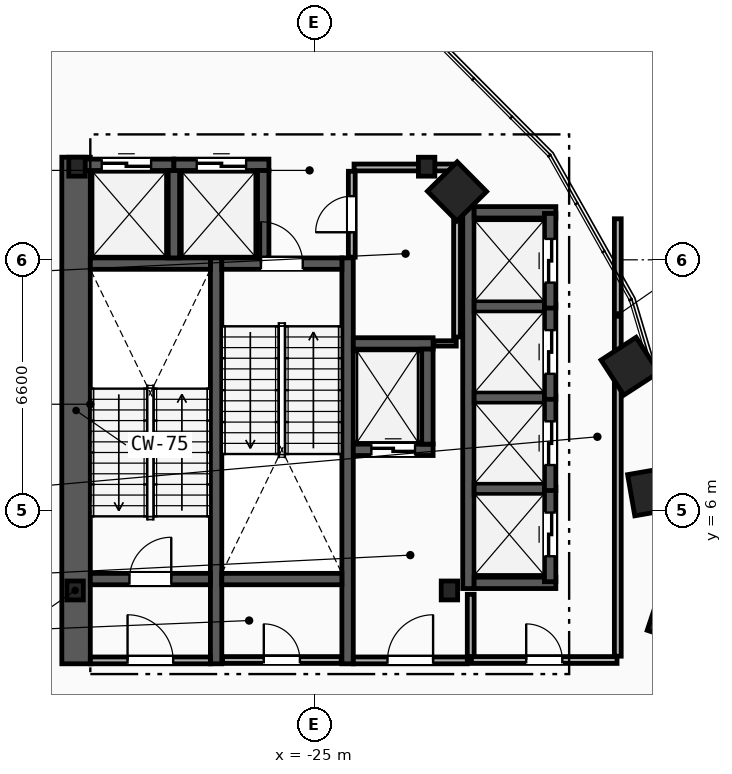
"""IFC4 building model, lengths in metres.
Left out: names, types, materials, properties, quantities, classifications, styles, units other than length and angle.
Written with IfcOpenShell. Run it as: python <this file> out.ifc"""

import sys

from ifc_helpers import new_model, si_unit, direction, frame, frame_2d, origin, origin_2d, place, context, subcontext, project, spatial, rectangle, i_section, extrude, element, fill, save


model = new_model("IFC4")
c1 = context("Model", 3, precision=1e-05, world=origin(), true_north=direction((0.0, 1.0)))
c2 = subcontext(c1, "Body", "Model", "MODEL_VIEW")
j1 = project(units=[si_unit("LENGTHUNIT", "METRE"), si_unit("PLANEANGLEUNIT", "RADIAN")], contexts=[c1])
p1 = place(None, origin())
s1 = spatial("IfcSite", under=j1, at=p1, CompositionType="ELEMENT")
p2 = place(p1, origin())
s2 = spatial("IfcBuilding", under=s1, at=p2, CompositionType="ELEMENT")
p3 = place(p2, frame((0.0, 0.0, 132.2)))
s3 = spatial("IfcBuildingStorey", under=s2, at=p3, CompositionType="ELEMENT", Elevation=132.2)
for number, where, z_axis, x_axis in (
    (1, (-31.3, 3.9, 0.0), (0.0, 0.0, 1.0), (1.0, 0.0, 0.0)),
    (2, (-21.45, 3.9, 0.0), (0.0, 0.0, 1.0), (1.0, 0.0, 0.0)),
    (3, (-22.05, 15.05, 0.0), (0.0, 0.0, 1.0), (1.0, 0.0, 0.0)),
    (4, (-31.25, 15.05, 0.0), (0.0, 0.0, 1.0), (1.0, 0.0, 0.0)),
):
    element("IfcColumn", number, at=place(p3, frame(where, z_axis=z_axis, x_axis=x_axis)), inside=s3, PredefinedType="COLUMN", context=c2, shape_type="SweptSolid", body=[
        extrude(i_section(OverallWidth=0.432, OverallDepth=0.498, WebThickness=0.056, FlangeThickness=0.089, FilletRadius=0.018, at=origin_2d()), origin(), (0.0, 0.0, 1.0), 4.6),
    ])
for number, where, z_axis, x_axis in (
    (5, (-15.55, 3.2, 0.0), (0.0, 0.0, 1.0), (0.315, 0.949, 0.0)),
    (6, (-16.125, 6.5, 0.0), (0.0, 0.0, 1.0), (-0.172, 0.985, 0.0)),
    (7, (-16.7, 9.8, 0.0), (0.0, 0.0, 1.0), (-0.544, 0.839, 0.0)),
    (8, (-21.25, 14.4, 0.0), (0.0, 0.0, 1.0), (-0.703, 0.711, 0.0)),
):
    element("IfcColumn", number, at=place(p3, frame(where, z_axis=z_axis, x_axis=x_axis)), inside=s3, PredefinedType="COLUMN", context=c2, shape_type="SweptSolid", body=[
        extrude(rectangle(XDim=1.1, YDim=1.1, at=origin_2d()), origin(), (0.0, 0.0, 1.0), 4.6),
    ])
p4 = place(p3, frame((-31.275, 1.97, 0.0), z_axis=(0.0, 0.0, 1.0), x_axis=(0.0, 1.0, 0.0)))
e9 = element("IfcWall", 9, at=p4, inside=s3, PredefinedType="SHEAR", context=c2, shape_type="SweptSolid", body=[
    extrude(rectangle(XDim=13.33, YDim=0.75, at=frame_2d((6.665, 0.0))), origin(), (0.0, 0.0, 1.0), 4.36),
])
for number, where, z_axis, x_axis in (
    (10, (-27.59, 1.97, 0.0), (0.0, 0.0, 1.0), (0.0, 1.0, 0.0)),
    (11, (-24.13, 1.97, 0.0), (0.0, 0.0, 1.0), (0.0, 1.0, 0.0)),
):
    element("IfcWall", number, at=place(p3, frame(where, z_axis=z_axis, x_axis=x_axis)), inside=s3, PredefinedType="SHEAR", context=c2, shape_type="SweptSolid", body=[
        extrude(rectangle(XDim=10.68, YDim=0.3, at=frame_2d((5.34, 0.0))), origin(), (0.0, 0.0, 1.0), 4.36),
    ])
p5 = place(p3, frame((-30.9, 4.2, 0.0), z_axis=(0.0, 0.0, 1.0), x_axis=(1.0, 0.0, 0.0)))
e12 = element("IfcWall", 12, at=p5, inside=s3, PredefinedType="SHEAR", context=c2, shape_type="SweptSolid", body=[
    extrude(rectangle(XDim=3.16, YDim=0.3, at=frame_2d((1.58, 0.0))), origin(), (0.0, 0.0, 1.0), 4.36),
])
p6 = place(p5, frame((1.03, 0.0, 0.0)))
e13 = element("IfcOpeningElement", 13, at=p6, cuts=e12, PredefinedType="OPENING", context=c2, shape_type="SweptSolid", body=[
    extrude(rectangle(XDim=1.1, YDim=2.15, at=frame_2d((0.55, 1.075))), frame((0.0, 0.16, 0.0), z_axis=(0.0, -1.0, 0.0), x_axis=(1.0, 0.0, 0.0)), (0.0, 0.0, 1.0), 0.32),
])
p7 = place(p3, frame((-30.9, 12.5, 0.0), z_axis=(0.0, 0.0, 1.0), x_axis=(1.0, 0.0, 0.0)))
e14 = element("IfcWall", 14, at=p7, inside=s3, PredefinedType="SHEAR", context=c2, shape_type="SweptSolid", body=[
    extrude(rectangle(XDim=3.16, YDim=0.3, at=frame_2d((1.58, 0.0))), origin(), (0.0, 0.0, 1.0), 4.36),
])
p8 = place(p3, frame((-27.44, 12.5, 0.0), z_axis=(0.0, 0.0, 1.0), x_axis=(1.0, 0.0, 0.0)))
e15 = element("IfcWall", 15, at=p8, inside=s3, PredefinedType="SHEAR", context=c2, shape_type="SweptSolid", body=[
    extrude(rectangle(XDim=3.16, YDim=0.3, at=frame_2d((1.58, 0.0))), origin(), (0.0, 0.0, 1.0), 4.36),
])
p9 = place(p8, frame((1.03, 0.0, 0.0)))
e16 = element("IfcOpeningElement", 16, at=p9, cuts=e15, PredefinedType="OPENING", context=c2, shape_type="SweptSolid", body=[
    extrude(rectangle(XDim=1.1, YDim=2.15, at=frame_2d((0.55, 1.075))), frame((0.0, 0.16, 0.0), z_axis=(0.0, -1.0, 0.0), x_axis=(1.0, 0.0, 0.0)), (0.0, 0.0, 1.0), 0.32),
])
p10 = place(p3, frame((-27.44, 4.2, 0.0), z_axis=(0.0, 0.0, 1.0), x_axis=(1.0, 0.0, 0.0)))
e17 = element("IfcWall", 17, at=p10, inside=s3, PredefinedType="SHEAR", context=c2, shape_type="SweptSolid", body=[
    extrude(rectangle(XDim=3.16, YDim=0.3, at=frame_2d((1.58, 0.0))), origin(), (0.0, 0.0, 1.0), 4.36),
])
p11 = place(p3, frame((-20.89, 2.15, 0.0), z_axis=(0.0, 0.0, 1.0), x_axis=(0.0, 1.0, 0.0)))
e18 = element("IfcWall", 18, at=p11, inside=s3, PredefinedType="PARTITIONING", context=c2, shape_type="SweptSolid", body=[
    extrude(rectangle(XDim=1.65, YDim=0.18, at=frame_2d((0.825, 0.0))), origin(), (0.0, 0.0, 1.0), 4.36),
])
p12 = place(p3, frame((-23.98, 2.06, 0.0), z_axis=(0.0, 0.0, 1.0), x_axis=(1.0, 0.0, 0.0)))
e19 = element("IfcWall", 19, at=p12, inside=s3, PredefinedType="PARTITIONING", context=c2, shape_type="SweptSolid", body=[
    extrude(rectangle(XDim=3.0, YDim=0.18, at=frame_2d((1.5, 0.0))), origin(), (0.0, 0.0, 1.0), 4.36),
])
p13 = place(p12, frame((0.9, 0.0, 0.0)))
e20 = element("IfcOpeningElement", 20, at=p13, cuts=e19, PredefinedType="OPENING", context=c2, shape_type="SweptSolid", body=[
    extrude(rectangle(XDim=1.2, YDim=2.15, at=frame_2d((0.6, 1.075))), frame((0.0, 0.1, 0.0), z_axis=(0.0, -1.0, 0.0), x_axis=(1.0, 0.0, 0.0)), (0.0, 0.0, 1.0), 0.2),
])
p14 = place(p3, frame((-30.9, 2.06, 0.0), z_axis=(0.0, 0.0, 1.0), x_axis=(1.0, 0.0, 0.0)))
e21 = element("IfcWall", 21, at=p14, inside=s3, PredefinedType="PARTITIONING", context=c2, shape_type="SweptSolid", body=[
    extrude(rectangle(XDim=3.16, YDim=0.18, at=frame_2d((1.58, 0.0))), origin(), (0.0, 0.0, 1.0), 4.36),
])
p15 = place(p14, frame((0.98, 0.0, 0.0)))
e22 = element("IfcOpeningElement", 22, at=p15, cuts=e21, PredefinedType="OPENING", context=c2, shape_type="SweptSolid", body=[
    extrude(rectangle(XDim=1.2, YDim=2.15, at=frame_2d((0.6, 1.075))), frame((0.0, 0.1, 0.0), z_axis=(0.0, -1.0, 0.0), x_axis=(1.0, 0.0, 0.0)), (0.0, 0.0, 1.0), 0.2),
])
p16 = place(p3, frame((-23.98, 7.6, 0.0), z_axis=(0.0, 0.0, 1.0), x_axis=(1.0, 0.0, 0.0)))
e23 = element("IfcWall", 23, at=p16, inside=s3, PredefinedType="SHEAR", context=c2, shape_type="SweptSolid", body=[
    extrude(rectangle(XDim=2.1, YDim=0.3, at=frame_2d((1.05, 0.0))), origin(), (0.0, 0.0, 1.0), 4.36),
])
p17 = place(p16, frame((0.475, 0.0, 0.0)))
e24 = element("IfcOpeningElement", 24, at=p17, cuts=e23, PredefinedType="OPENING", context=c2, shape_type="SweptSolid", body=[
    extrude(rectangle(XDim=1.15, YDim=2.2, at=frame_2d((0.575, 1.1))), frame((0.0, 0.16, 0.0), z_axis=(0.0, -1.0, 0.0), x_axis=(1.0, 0.0, 0.0)), (0.0, 0.0, 1.0), 0.32),
])
p18 = place(p3, frame((-23.98, 10.4, 0.0), z_axis=(0.0, 0.0, 1.0), x_axis=(1.0, 0.0, 0.0)))
e25 = element("IfcWall", 25, at=p18, inside=s3, PredefinedType="SHEAR", context=c2, shape_type="SweptSolid", body=[
    extrude(rectangle(XDim=2.1, YDim=0.3, at=frame_2d((1.05, 0.0))), origin(), (0.0, 0.0, 1.0), 4.36),
])
p19 = place(p3, frame((-22.03, 7.75, 0.0), z_axis=(0.0, 0.0, 1.0), x_axis=(0.0, 1.0, 0.0)))
e26 = element("IfcWall", 26, at=p19, inside=s3, PredefinedType="SHEAR", context=c2, shape_type="SweptSolid", body=[
    extrude(rectangle(XDim=2.5, YDim=0.3, at=frame_2d((1.25, 0.0))), origin(), (0.0, 0.0, 1.0), 4.36),
])
p20 = place(p3, frame((-31.2, 15.1, 0.0), z_axis=(0.0, 0.0, 1.0), x_axis=(1.0, 0.0, 0.0)))
e27 = element("IfcWall", 27, at=p20, inside=s3, PredefinedType="SHEAR", context=c2, shape_type="SweptSolid", body=[
    extrude(rectangle(XDim=2.5, YDim=0.3, at=frame_2d((1.25, 0.0))), origin(), (0.0, 0.0, 1.0), 4.36),
])
p21 = place(p20, frame((0.6, 0.0, 0.0)))
e28 = element("IfcOpeningElement", 28, at=p21, cuts=e27, PredefinedType="OPENING", context=c2, shape_type="SweptSolid", body=[
    extrude(rectangle(XDim=1.3, YDim=2.2, at=frame_2d((0.65, 1.1))), frame((0.0, 0.16, 0.0), z_axis=(0.0, -1.0, 0.0), x_axis=(1.0, 0.0, 0.0)), (0.0, 0.0, 1.0), 0.32),
])
p22 = place(p3, frame((-28.7, 12.65, 0.0), z_axis=(0.0, 0.0, 1.0), x_axis=(0.0, 1.0, 0.0)))
e29 = element("IfcWall", 29, at=p22, inside=s3, PredefinedType="SHEAR", context=c2, shape_type="SweptSolid", body=[
    extrude(rectangle(XDim=2.3, YDim=0.3, at=frame_2d((1.15, 0.0))), origin(), (0.0, 0.0, 1.0), 4.36),
])
p23 = place(p3, frame((-28.7, 15.1, 0.0), z_axis=(0.0, 0.0, 1.0), x_axis=(1.0, 0.0, 0.0)))
e30 = element("IfcWall", 30, at=p23, inside=s3, PredefinedType="SHEAR", context=c2, shape_type="SweptSolid", body=[
    extrude(rectangle(XDim=2.5, YDim=0.3, at=frame_2d((1.25, 0.0))), origin(), (0.0, 0.0, 1.0), 4.36),
])
p24 = place(p23, frame((0.6, 0.0, 0.0)))
e31 = element("IfcOpeningElement", 31, at=p24, cuts=e30, PredefinedType="OPENING", context=c2, shape_type="SweptSolid", body=[
    extrude(rectangle(XDim=1.3, YDim=2.2, at=frame_2d((0.65, 1.1))), frame((0.0, 0.16, 0.0), z_axis=(0.0, -1.0, 0.0), x_axis=(1.0, 0.0, 0.0)), (0.0, 0.0, 1.0), 0.32),
])
p25 = place(p3, frame((-26.35, 12.65, 0.0), z_axis=(0.0, 0.0, 1.0), x_axis=(0.0, 1.0, 0.0)))
e32 = element("IfcWall", 32, at=p25, inside=s3, PredefinedType="SHEAR", context=c2, shape_type="SweptSolid", body=[
    extrude(rectangle(XDim=2.3, YDim=0.3, at=frame_2d((1.15, 0.0))), origin(), (0.0, 0.0, 1.0), 4.36),
])
p26 = place(p3, frame((-20.95, 3.95, 0.0), z_axis=(0.0, 0.0, 1.0), x_axis=(0.0, 1.0, 0.0)))
e33 = element("IfcWall", 33, at=p26, inside=s3, PredefinedType="SHEAR", context=c2, shape_type="SweptSolid", body=[
    extrude(rectangle(XDim=10.05, YDim=0.3, at=frame_2d((5.025, 0.0))), origin(), (0.0, 0.0, 1.0), 4.36),
])
for number, where, z_axis, x_axis in (
    (34, (-20.8, 4.1, 0.0), (0.0, 0.0, 1.0), (1.0, 0.0, 0.0)),
    (35, (-20.8, 13.85, 0.0), (0.0, 0.0, 1.0), (1.0, 0.0, 0.0)),
):
    element("IfcWall", number, at=place(p3, frame(where, z_axis=z_axis, x_axis=x_axis)), inside=s3, PredefinedType="SHEAR", context=c2, shape_type="SweptSolid", body=[
        extrude(rectangle(XDim=2.15, YDim=0.3, at=frame_2d((1.075, 0.0))), origin(), (0.0, 0.0, 1.0), 4.36),
    ])
for number, where, z_axis, x_axis in (
    (36, (-20.8, 6.575, 0.0), (0.0, 0.0, 1.0), (1.0, 0.0, 0.0)),
    (37, (-20.8, 8.975, 0.0), (0.0, 0.0, 1.0), (1.0, 0.0, 0.0)),
    (38, (-20.8, 11.375, 0.0), (0.0, 0.0, 1.0), (1.0, 0.0, 0.0)),
):
    element("IfcWall", number, at=place(p3, frame(where, z_axis=z_axis, x_axis=x_axis)), inside=s3, PredefinedType="SHEAR", context=c2, shape_type="SweptSolid", body=[
        extrude(rectangle(XDim=1.85, YDim=0.3, at=frame_2d((0.925, 0.0))), origin(), (0.0, 0.0, 1.0), 4.36),
    ])
p27 = place(p3, frame((-18.8, 4.13, 0.0), z_axis=(0.0, 0.0, 1.0), x_axis=(0.0, 1.0, 0.0)))
e39 = element("IfcWall", 39, at=p27, inside=s3, PredefinedType="SHEAR", context=c2, shape_type="SweptSolid", body=[
    extrude(rectangle(XDim=2.49, YDim=0.3, at=frame_2d((1.245, 0.0))), origin(), (0.0, 0.0, 1.0), 4.36),
])
p28 = place(p27, frame((0.67, 0.0, 0.0)))
e40 = element("IfcOpeningElement", 40, at=p28, cuts=e39, PredefinedType="OPENING", context=c2, shape_type="SweptSolid", body=[
    extrude(rectangle(XDim=1.15, YDim=2.2, at=frame_2d((0.575, 1.1))), frame((0.0, 0.16, 0.0), z_axis=(0.0, -1.0, 0.0), x_axis=(1.0, 0.0, 0.0)), (0.0, 0.0, 1.0), 0.32),
])
p29 = place(p3, frame((-18.8, 6.53, 0.0), z_axis=(0.0, 0.0, 1.0), x_axis=(0.0, 1.0, 0.0)))
e41 = element("IfcWall", 41, at=p29, inside=s3, PredefinedType="SHEAR", context=c2, shape_type="SweptSolid", body=[
    extrude(rectangle(XDim=2.49, YDim=0.3, at=frame_2d((1.245, 0.0))), origin(), (0.0, 0.0, 1.0), 4.36),
])
p30 = place(p29, frame((0.67, 0.0, 0.0)))
e42 = element("IfcOpeningElement", 42, at=p30, cuts=e41, PredefinedType="OPENING", context=c2, shape_type="SweptSolid", body=[
    extrude(rectangle(XDim=1.15, YDim=2.2, at=frame_2d((0.575, 1.1))), frame((0.0, 0.16, 0.0), z_axis=(0.0, -1.0, 0.0), x_axis=(1.0, 0.0, 0.0)), (0.0, 0.0, 1.0), 0.32),
])
p31 = place(p3, frame((-18.8, 8.93, 0.0), z_axis=(0.0, 0.0, 1.0), x_axis=(0.0, 1.0, 0.0)))
e43 = element("IfcWall", 43, at=p31, inside=s3, PredefinedType="SHEAR", context=c2, shape_type="SweptSolid", body=[
    extrude(rectangle(XDim=2.49, YDim=0.3, at=frame_2d((1.245, 0.0))), origin(), (0.0, 0.0, 1.0), 4.36),
])
p32 = place(p31, frame((0.67, 0.0, 0.0)))
e44 = element("IfcOpeningElement", 44, at=p32, cuts=e43, PredefinedType="OPENING", context=c2, shape_type="SweptSolid", body=[
    extrude(rectangle(XDim=1.15, YDim=2.2, at=frame_2d((0.575, 1.1))), frame((0.0, 0.16, 0.0), z_axis=(0.0, -1.0, 0.0), x_axis=(1.0, 0.0, 0.0)), (0.0, 0.0, 1.0), 0.32),
])
p33 = place(p3, frame((-18.8, 11.33, 0.0), z_axis=(0.0, 0.0, 1.0), x_axis=(0.0, 1.0, 0.0)))
e45 = element("IfcWall", 45, at=p33, inside=s3, PredefinedType="SHEAR", context=c2, shape_type="SweptSolid", body=[
    extrude(rectangle(XDim=2.49, YDim=0.3, at=frame_2d((1.245, 0.0))), origin(), (0.0, 0.0, 1.0), 4.36),
])
p34 = place(p33, frame((0.67, 0.0, 0.0)))
e46 = element("IfcOpeningElement", 46, at=p34, cuts=e45, PredefinedType="OPENING", context=c2, shape_type="SweptSolid", body=[
    extrude(rectangle(XDim=1.15, YDim=2.2, at=frame_2d((0.575, 1.1))), frame((0.0, 0.16, 0.0), z_axis=(0.0, -1.0, 0.0), x_axis=(1.0, 0.0, 0.0)), (0.0, 0.0, 1.0), 0.32),
])
p35 = place(p3, frame((-17.02, 2.17, 0.0), z_axis=(0.0, 0.0, 1.0), x_axis=(0.0, 1.0, 0.0)))
e47 = element("IfcWall", 47, at=p35, inside=s3, PredefinedType="PARTITIONING", context=c2, shape_type="SweptSolid", body=[
    extrude(rectangle(XDim=11.51, YDim=0.18, at=frame_2d((5.755, 0.0))), origin(), (0.0, 0.0, 1.0), 4.36),
])
p36 = place(p3, frame((-20.87, 2.07, 0.0), z_axis=(0.0, 0.0, 1.0), x_axis=(1.0, 0.0, 0.0)))
e48 = element("IfcWall", 48, at=p36, inside=s3, PredefinedType="PARTITIONING", context=c2, shape_type="SweptSolid", body=[
    extrude(rectangle(XDim=3.83, YDim=0.18, at=frame_2d((1.915, 0.0))), origin(), (0.0, 0.0, 1.0), 4.36),
])
p37 = place(p36, frame((1.44, 0.0, 0.0)))
e49 = element("IfcOpeningElement", 49, at=p37, cuts=e48, PredefinedType="OPENING", context=c2, shape_type="SweptSolid", body=[
    extrude(rectangle(XDim=0.95, YDim=2.1, at=frame_2d((0.475, 1.05))), frame((0.0, 0.1, 0.0), z_axis=(0.0, -1.0, 0.0), x_axis=(1.0, 0.0, 0.0)), (0.0, 0.0, 1.0), 0.2),
])
p38 = place(p3, frame((-21.86, 10.4, 0.0), z_axis=(0.0, 0.0, 1.0), x_axis=(1.0, 0.0, 0.0)))
e50 = element("IfcWall", 50, at=p38, inside=s3, PredefinedType="PARTITIONING", context=c2, shape_type="SweptSolid", body=[
    extrude(rectangle(XDim=0.59, YDim=0.14, at=frame_2d((0.295, 0.0))), origin(), (0.0, 0.0, 1.0), 4.36),
])
p39 = place(p3, frame((-21.25, 10.57, 0.0), z_axis=(0.0, 0.0, 1.0), x_axis=(0.0, 1.0, 0.0)))
e51 = element("IfcWall", 51, at=p39, inside=s3, PredefinedType="PARTITIONING", context=c2, shape_type="SweptSolid", body=[
    extrude(rectangle(XDim=4.36, YDim=0.18, at=frame_2d((2.18, 0.0))), origin(), (0.0, 0.0, 1.0), 4.36),
])
p40 = place(p3, frame((-23.96, 15.03, 0.0), z_axis=(0.0, 0.0, 1.0), x_axis=(1.0, 0.0, 0.0)))
e52 = element("IfcWall", 52, at=p40, inside=s3, PredefinedType="PARTITIONING", context=c2, shape_type="SweptSolid", body=[
    extrude(rectangle(XDim=2.61, YDim=0.18, at=frame_2d((1.305, 0.0))), origin(), (0.0, 0.0, 1.0), 3.433),
])
p41 = place(p3, frame((-27.42, 2.07, 0.0), z_axis=(0.0, 0.0, 1.0), x_axis=(1.0, 0.0, 0.0)))
e53 = element("IfcWall", 53, at=p41, inside=s3, PredefinedType="PARTITIONING", context=c2, shape_type="SweptSolid", body=[
    extrude(rectangle(XDim=3.12, YDim=0.18, at=frame_2d((1.56, 0.0))), origin(), (0.0, 0.0, 1.0), 4.36),
])
p42 = place(p41, frame((1.085, 0.0, 0.0)))
e54 = element("IfcOpeningElement", 54, at=p42, cuts=e53, PredefinedType="OPENING", context=c2, shape_type="SweptSolid", body=[
    extrude(rectangle(XDim=0.95, YDim=2.1, at=frame_2d((0.475, 1.05))), frame((0.0, 0.1, 0.0), z_axis=(0.0, -1.0, 0.0), x_axis=(1.0, 0.0, 0.0)), (0.0, 0.0, 1.0), 0.2),
])
p43 = place(p3, frame((-24.02, 12.67, 0.0), z_axis=(0.0, 0.0, 1.0), x_axis=(0.0, 1.0, 0.0)))
e55 = element("IfcWall", 55, at=p43, inside=s3, PredefinedType="PARTITIONING", context=c2, shape_type="SweptSolid", body=[
    extrude(rectangle(XDim=2.26, YDim=0.18, at=frame_2d((1.13, 0.0))), origin(), (0.0, 0.0, 1.0), 4.36),
])
p44 = place(p43, frame((0.655, 0.0, 0.0)))
e56 = element("IfcOpeningElement", 56, at=p44, cuts=e55, PredefinedType="OPENING", context=c2, shape_type="SweptSolid", body=[
    extrude(rectangle(XDim=0.95, YDim=2.1, at=frame_2d((0.475, 1.05))), frame((0.0, 0.1, 0.0), z_axis=(0.0, -1.0, 0.0), x_axis=(1.0, 0.0, 0.0)), (0.0, 0.0, 1.0), 0.2),
])
p45 = place(p6, origin())
e57 = element("IfcDoor", 57, at=p45, inside=s3, OperationType="SINGLE_SWING_RIGHT", PredefinedType="DOOR", context=c2, shape_type="SweptSolid", body=[
    extrude(rectangle(XDim=1.1, YDim=2.15, at=frame_2d((0.55, 1.075))), frame((0.0, 0.025, 0.0), z_axis=(0.0, -1.0, 0.0), x_axis=(1.0, 0.0, 0.0)), (0.0, 0.0, 1.0), 0.05),
])
fill(e13, e57)
p46 = place(p9, origin())
e58 = element("IfcDoor", 58, at=p46, inside=s3, OperationType="SINGLE_SWING_LEFT", PredefinedType="DOOR", context=c2, shape_type="SweptSolid", body=[
    extrude(rectangle(XDim=1.1, YDim=2.15, at=frame_2d((0.55, 1.075))), frame((0.0, 0.025, 0.0), z_axis=(0.0, -1.0, 0.0), x_axis=(1.0, 0.0, 0.0)), (0.0, 0.0, 1.0), 0.05),
])
fill(e16, e58)
p47 = place(p13, origin())
e59 = element("IfcDoor", 59, at=p47, inside=s3, OperationType="SINGLE_SWING_RIGHT", PredefinedType="DOOR", context=c2, shape_type="SweptSolid", body=[
    extrude(rectangle(XDim=1.2, YDim=2.15, at=frame_2d((0.6, 1.075))), frame((0.0, 0.025, 0.0), z_axis=(0.0, -1.0, 0.0), x_axis=(1.0, 0.0, 0.0)), (0.0, 0.0, 1.0), 0.05),
])
fill(e20, e59)
p48 = place(p15, origin())
e60 = element("IfcDoor", 60, at=p48, inside=s3, OperationType="SINGLE_SWING_LEFT", PredefinedType="DOOR", context=c2, shape_type="SweptSolid", body=[
    extrude(rectangle(XDim=1.2, YDim=2.15, at=frame_2d((0.6, 1.075))), frame((0.0, 0.025, 0.0), z_axis=(0.0, -1.0, 0.0), x_axis=(1.0, 0.0, 0.0)), (0.0, 0.0, 1.0), 0.05),
])
fill(e22, e60)
p49 = place(p17, origin())
e61 = element("IfcDoor", 61, at=p49, inside=s3, OperationType="SLIDING_TO_LEFT", PredefinedType="TRAPDOOR", context=c2, shape_type="SweptSolid", body=[
    extrude(rectangle(XDim=1.15, YDim=2.2, at=frame_2d((0.575, 1.1))), frame((0.0, 0.025, 0.0), z_axis=(0.0, -1.0, 0.0), x_axis=(1.0, 0.0, 0.0)), (0.0, 0.0, 1.0), 0.05),
])
fill(e24, e61)
p50 = place(p21, origin())
e62 = element("IfcDoor", 62, at=p50, inside=s3, OperationType="SLIDING_TO_LEFT", PredefinedType="TRAPDOOR", context=c2, shape_type="SweptSolid", body=[
    extrude(rectangle(XDim=1.3, YDim=2.2, at=frame_2d((0.65, 1.1))), frame((0.0, 0.025, 0.0), z_axis=(0.0, -1.0, 0.0), x_axis=(1.0, 0.0, 0.0)), (0.0, 0.0, 1.0), 0.05),
])
fill(e28, e62)
p51 = place(p24, origin())
e63 = element("IfcDoor", 63, at=p51, inside=s3, OperationType="SLIDING_TO_LEFT", PredefinedType="TRAPDOOR", context=c2, shape_type="SweptSolid", body=[
    extrude(rectangle(XDim=1.3, YDim=2.2, at=frame_2d((0.65, 1.1))), frame((0.0, 0.025, 0.0), z_axis=(0.0, -1.0, 0.0), x_axis=(1.0, 0.0, 0.0)), (0.0, 0.0, 1.0), 0.05),
])
fill(e31, e63)
p52 = place(p28, origin())
e64 = element("IfcDoor", 64, at=p52, inside=s3, OperationType="SLIDING_TO_LEFT", PredefinedType="TRAPDOOR", context=c2, shape_type="SweptSolid", body=[
    extrude(rectangle(XDim=1.15, YDim=2.2, at=frame_2d((0.575, 1.1))), frame((0.0, 0.025, 0.0), z_axis=(0.0, -1.0, 0.0), x_axis=(1.0, 0.0, 0.0)), (0.0, 0.0, 1.0), 0.05),
])
fill(e40, e64)
p53 = place(p30, origin())
e65 = element("IfcDoor", 65, at=p53, inside=s3, OperationType="SLIDING_TO_LEFT", PredefinedType="TRAPDOOR", context=c2, shape_type="SweptSolid", body=[
    extrude(rectangle(XDim=1.15, YDim=2.2, at=frame_2d((0.575, 1.1))), frame((0.0, 0.025, 0.0), z_axis=(0.0, -1.0, 0.0), x_axis=(1.0, 0.0, 0.0)), (0.0, 0.0, 1.0), 0.05),
])
fill(e42, e65)
p54 = place(p32, origin())
e66 = element("IfcDoor", 66, at=p54, inside=s3, OperationType="SLIDING_TO_LEFT", PredefinedType="TRAPDOOR", context=c2, shape_type="SweptSolid", body=[
    extrude(rectangle(XDim=1.15, YDim=2.2, at=frame_2d((0.575, 1.1))), frame((0.0, 0.025, 0.0), z_axis=(0.0, -1.0, 0.0), x_axis=(1.0, 0.0, 0.0)), (0.0, 0.0, 1.0), 0.05),
])
fill(e44, e66)
p55 = place(p34, origin())
e67 = element("IfcDoor", 67, at=p55, inside=s3, OperationType="SLIDING_TO_LEFT", PredefinedType="TRAPDOOR", context=c2, shape_type="SweptSolid", body=[
    extrude(rectangle(XDim=1.15, YDim=2.2, at=frame_2d((0.575, 1.1))), frame((0.0, 0.025, 0.0), z_axis=(0.0, -1.0, 0.0), x_axis=(1.0, 0.0, 0.0)), (0.0, 0.0, 1.0), 0.05),
])
fill(e46, e67)
p56 = place(p37, origin())
e68 = element("IfcDoor", 68, at=p56, inside=s3, OperationType="SINGLE_SWING_LEFT", PredefinedType="DOOR", context=c2, shape_type="SweptSolid", body=[
    extrude(rectangle(XDim=0.95, YDim=2.1, at=frame_2d((0.475, 1.05))), frame((0.0, 0.025, 0.0), z_axis=(0.0, -1.0, 0.0), x_axis=(1.0, 0.0, 0.0)), (0.0, 0.0, 1.0), 0.05),
])
fill(e49, e68)
p57 = place(p42, origin())
e69 = element("IfcDoor", 69, at=p57, inside=s3, OperationType="SINGLE_SWING_LEFT", PredefinedType="DOOR", context=c2, shape_type="SweptSolid", body=[
    extrude(rectangle(XDim=0.95, YDim=2.1, at=frame_2d((0.475, 1.05))), frame((0.0, 0.025, 0.0), z_axis=(0.0, -1.0, 0.0), x_axis=(1.0, 0.0, 0.0)), (0.0, 0.0, 1.0), 0.05),
])
fill(e54, e69)
p58 = place(p44, origin())
e70 = element("IfcDoor", 70, at=p58, inside=s3, OperationType="SINGLE_SWING_LEFT", PredefinedType="DOOR", context=c2, shape_type="SweptSolid", body=[
    extrude(rectangle(XDim=0.95, YDim=2.1, at=frame_2d((0.475, 1.05))), frame((0.0, 0.025, 0.0), z_axis=(0.0, -1.0, 0.0), x_axis=(1.0, 0.0, 0.0)), (0.0, 0.0, 1.0), 0.05),
])
fill(e56, e70)
save(model, sys.argv[1])
